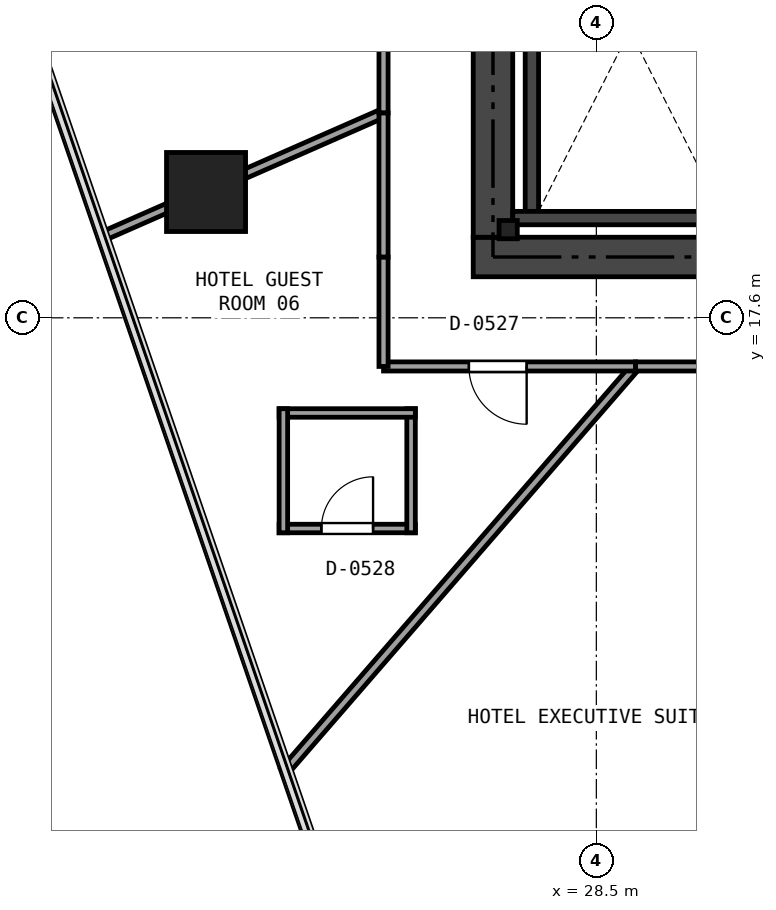
"""IFC4 building model, lengths in metres.
Left out: names, types, materials, properties, quantities, classifications, styles, units other than length and angle.
Written with IfcOpenShell. Run it as: python <this file> out.ifc"""

import sys

from ifc_helpers import new_model, si_unit, direction, frame, frame_2d, origin, origin_2d, place, context, subcontext, project, spatial, rectangle, i_section, extrude, element, fill, save


model = new_model("IFC4")
c1 = context("Model", 3, precision=1e-05, world=origin(), true_north=direction((0.0, 1.0)))
c2 = subcontext(c1, "Body", "Model", "MODEL_VIEW")
j1 = project(units=[si_unit("LENGTHUNIT", "METRE"), si_unit("PLANEANGLEUNIT", "RADIAN")], contexts=[c1])
p1 = place(None, origin())
s1 = spatial("IfcSite", under=j1, at=p1, CompositionType="ELEMENT")
p2 = place(p1, origin())
s2 = spatial("IfcBuilding", under=s1, at=p2, CompositionType="ELEMENT")
p3 = place(p2, frame((0.0, 0.0, 27.0)))
s3 = spatial("IfcBuildingStorey", under=s2, at=p3, CompositionType="ELEMENT", Elevation=27.0)
p4 = place(p3, frame((26.475, 18.6, 0.0), z_axis=(0.0, 0.0, 1.0), x_axis=(1.0, 0.0, 0.0)))
e1 = element("IfcWall", 1, at=p4, inside=s3, PredefinedType="SHEAR", context=c2, shape_type="SweptSolid", body=[
    extrude(rectangle(XDim=21.45, YDim=0.65, at=frame_2d((10.725, 0.0))), origin(), (0.0, 0.0, 1.0), 3.17),
])
p5 = place(p4, frame((12.45, 0.0, 0.0)))
e2 = element("IfcOpeningElement", 2, at=p5, cuts=e1, PredefinedType="OPENING", context=c2, shape_type="SweptSolid", body=[
    extrude(rectangle(XDim=1.15, YDim=2.15, at=frame_2d((0.575, 1.075))), frame((0.0, 0.335, 0.0), z_axis=(0.0, -1.0, 0.0), x_axis=(1.0, 0.0, 0.0)), (0.0, 0.0, 1.0), 0.67),
])
p6 = place(p4, frame((5.275, 0.0, 0.0)))
e3 = element("IfcOpeningElement", 3, at=p6, cuts=e1, PredefinedType="OPENING", context=c2, shape_type="SweptSolid", body=[
    extrude(rectangle(XDim=0.9, YDim=2.1, at=frame_2d((0.45, 1.05))), frame((0.0, 0.335, 0.0), z_axis=(0.0, -1.0, 0.0), x_axis=(1.0, 0.0, 0.0)), (0.0, 0.0, 1.0), 0.67),
])
p7 = place(p3, frame((26.8, 18.925, 0.0), z_axis=(0.0, 0.0, 1.0), x_axis=(0.0, 1.0, 0.0)))
e4 = element("IfcWall", 4, at=p7, inside=s3, PredefinedType="SHEAR", context=c2, shape_type="SweptSolid", body=[
    extrude(rectangle(XDim=14.95, YDim=0.65, at=frame_2d((7.475, 0.0))), origin(), (0.0, 0.0, 1.0), 3.17),
])
p8 = place(p3, frame((27.44, 19.35, 0.0), z_axis=(0.0, 0.0, 1.0), x_axis=(0.0, 1.0, 0.0)))
e5 = element("IfcWall", 5, at=p8, inside=s3, PredefinedType="SHEAR", context=c2, shape_type="SweptSolid", body=[
    extrude(rectangle(XDim=7.4, YDim=0.22, at=frame_2d((3.7, 0.0))), origin(), (0.0, 0.0, 1.0), 3.17),
])
p9 = place(p3, frame((27.125, 19.24, 0.0), z_axis=(0.0, 0.0, 1.0), x_axis=(1.0, 0.0, 0.0)))
e6 = element("IfcWall", 6, at=p9, inside=s3, PredefinedType="SHEAR", context=c2, shape_type="SweptSolid", body=[
    extrude(rectangle(XDim=3.425, YDim=0.22, at=frame_2d((1.712, 0.0))), origin(), (0.0, 0.0, 1.0), 3.17),
])
p10 = place(p3, frame((22.081, 19.669, -0.405), z_axis=(0.0, 0.0, 1.0), x_axis=(1.0, 0.0, 0.0)))
e7 = element("IfcColumn", 7, at=p10, inside=s3, PredefinedType="COLUMN", context=c2, shape_type="SweptSolid", body=[
    extrude(rectangle(XDim=1.3, YDim=1.3, at=origin_2d()), origin(), (0.0, 0.0, 1.0), 3.575),
])
p11 = place(p3, frame((27.05, 19.05, 0.0), z_axis=(0.0, 0.0, 1.0), x_axis=(1.0, 0.0, 0.0)))
e8 = element("IfcColumn", 8, at=p11, inside=s3, PredefinedType="PILASTER", context=c2, shape_type="SweptSolid", body=[
    extrude(i_section(OverallWidth=0.3, OverallDepth=0.3, WebThickness=0.011, FlangeThickness=0.019, at=origin_2d()), origin(), (0.0, 0.0, 1.0), 3.17),
])
p12 = place(p3, frame((23.283, 14.135, 0.0), z_axis=(0.0, 0.0, 1.0), x_axis=(1.0, 0.0, 0.0)))
e9 = element("IfcWall", 9, at=p12, inside=s3, PredefinedType="PARTITIONING", context=c2, shape_type="SweptSolid", body=[
    extrude(rectangle(XDim=2.24, YDim=0.14, at=frame_2d((1.12, 0.0))), origin(), (0.0, 0.0, 1.0), 3.17),
])
p13 = place(p12, frame((0.695, 0.0, 0.0)))
e10 = element("IfcOpeningElement", 10, at=p13, cuts=e9, PredefinedType="OPENING", context=c2, shape_type="SweptSolid", body=[
    extrude(rectangle(XDim=0.85, YDim=2.1, at=frame_2d((0.425, 1.05))), frame((0.0, 0.08, 0.0), z_axis=(0.0, -1.0, 0.0), x_axis=(1.0, 0.0, 0.0)), (0.0, 0.0, 1.0), 0.16),
])
p14 = place(p3, frame((25.453, 14.065, 0.0), z_axis=(0.0, 0.0, 1.0), x_axis=(0.0, 1.0, 0.0)))
e11 = element("IfcWall", 11, at=p14, inside=s3, PredefinedType="PARTITIONING", context=c2, shape_type="SweptSolid", body=[
    extrude(rectangle(XDim=2.04, YDim=0.14, at=frame_2d((1.02, 0.0))), origin(), (0.0, 0.0, 1.0), 3.17),
])
p15 = place(p3, frame((25.523, 16.035, 0.0), z_axis=(0.0, 0.0, 1.0), x_axis=(-1.0, 0.0, 0.0)))
e12 = element("IfcWall", 12, at=p15, inside=s3, PredefinedType="PARTITIONING", context=c2, shape_type="SweptSolid", body=[
    extrude(rectangle(XDim=2.24, YDim=0.14, at=frame_2d((1.12, 0.0))), origin(), (0.0, 0.0, 1.0), 3.17),
])
p16 = place(p3, frame((23.353, 16.105, 0.0), z_axis=(0.0, 0.0, 1.0), x_axis=(0.0, -1.0, 0.0)))
e13 = element("IfcWall", 13, at=p16, inside=s3, PredefinedType="PARTITIONING", context=c2, shape_type="SweptSolid", body=[
    extrude(rectangle(XDim=2.04, YDim=0.14, at=frame_2d((1.02, 0.0))), origin(), (0.0, 0.0, 1.0), 3.17),
])
p17 = place(p3, frame((20.36, 18.93, 0.0), z_axis=(0.0, 0.0, 1.0), x_axis=(0.915567029413, 0.402165407079, 0.0)))
e14 = element("IfcWall", 14, at=p17, inside=s3, PredefinedType="PARTITIONING", context=c2, shape_type="SweptSolid", body=[
    extrude(rectangle(XDim=5.068, YDim=0.15, at=frame_2d((2.534, 0.0))), origin(), (0.0, 0.0, 1.0), 2.395),
])
p18 = place(p3, frame((25.0, 20.968, 0.0), z_axis=(0.0, 0.0, 1.0), x_axis=(0.0, 1.0, 0.0)))
e15 = element("IfcWall", 15, at=p18, inside=s3, PredefinedType="PARTITIONING", context=c2, shape_type="SweptSolid", body=[
    extrude(rectangle(XDim=6.714, YDim=0.15, at=frame_2d((3.357, 0.0))), origin(), (0.0, 0.0, 1.0), 2.395),
])
p19 = place(p18, frame((2.882, 0.0, 0.0)))
e16 = element("IfcOpeningElement", 16, at=p19, cuts=e15, PredefinedType="OPENING", context=c2, shape_type="SweptSolid", body=[
    extrude(rectangle(XDim=0.95, YDim=2.15, at=frame_2d((0.475, 1.075))), frame((0.0, 0.085, 0.0), z_axis=(0.0, -1.0, 0.0), x_axis=(1.0, 0.0, 0.0)), (0.0, 0.0, 1.0), 0.17),
])
p20 = place(p3, frame((23.368, 10.14, 0.0), z_axis=(0.0, 0.0, 1.0), x_axis=(0.655252017972, 0.75541034739, 0.0)))
e17 = element("IfcWall", 17, at=p20, inside=s3, PredefinedType="PARTITIONING", context=c2, shape_type="SweptSolid", body=[
    extrude(rectangle(XDim=8.817, YDim=0.15, at=frame_2d((4.408, 0.0))), origin(), (0.0, 0.0, 1.0), 2.355),
])
p21 = place(p3, frame((29.145, 16.8, 0.0), z_axis=(0.0, 0.0, 1.0), x_axis=(-1.0, 0.0, 0.0)))
e18 = element("IfcWall", 18, at=p21, inside=s3, PredefinedType="PARTITIONING", context=c2, shape_type="SweptSolid", body=[
    extrude(rectangle(XDim=4.145, YDim=0.15, at=frame_2d((2.073, 0.0))), origin(), (0.0, 0.0, 1.0), 2.355),
])
p22 = place(p21, frame((1.791, 0.0, 0.0)))
e19 = element("IfcOpeningElement", 19, at=p22, cuts=e18, PredefinedType="OPENING", context=c2, shape_type="SweptSolid", body=[
    extrude(rectangle(XDim=0.95, YDim=2.15, at=frame_2d((0.475, 1.075))), frame((0.0, 0.085, 0.0), z_axis=(0.0, -1.0, 0.0), x_axis=(1.0, 0.0, 0.0)), (0.0, 0.0, 1.0), 0.17),
])
p23 = place(p3, frame((25.0, 16.8, 0.0), z_axis=(0.0, 0.0, 1.0), x_axis=(0.0, 1.0, 0.0)))
e20 = element("IfcWall", 20, at=p23, inside=s3, PredefinedType="PARTITIONING", context=c2, shape_type="SweptSolid", body=[
    extrude(rectangle(XDim=1.8, YDim=0.15, at=frame_2d((0.9, 0.0))), origin(), (0.0, 0.0, 1.0), 2.355),
])
p24 = place(p3, frame((25.0, 18.6, 0.0), z_axis=(0.0, 0.0, 1.0), x_axis=(0.0, 1.0, 0.0)))
e21 = element("IfcWall", 21, at=p24, inside=s3, PredefinedType="PARTITIONING", context=c2, shape_type="SweptSolid", body=[
    extrude(rectangle(XDim=2.368, YDim=0.15, at=frame_2d((1.184, 0.0))), origin(), (0.0, 0.0, 1.0), 2.395),
])
p25 = place(p3, frame((29.044, 1.056, 0.0), z_axis=(0.0, 0.0, 1.0), x_axis=(0.304719993412, 0.952441980183, 0.0)))
e22 = element("IfcWall", 22, at=p25, inside=s3, PredefinedType="PARTITIONING", context=c2, shape_type="SweptSolid", body=[
    extrude(rectangle(XDim=16.53, YDim=0.15, at=frame_2d((8.265, 0.0))), origin(), (0.0, 0.0, 1.0), 2.395),
])
p26 = place(p3, frame((34.081, 16.8, 0.0), z_axis=(0.0, 0.0, 1.0), x_axis=(-1.0, 0.0, 0.0)))
e23 = element("IfcWall", 23, at=p26, inside=s3, PredefinedType="PARTITIONING", context=c2, shape_type="SweptSolid", body=[
    extrude(rectangle(XDim=4.936, YDim=0.15, at=frame_2d((2.468, 0.0))), origin(), (0.0, 0.0, 1.0), 2.395),
])
p27 = place(p26, frame((1.993, 0.0, 0.0)))
e24 = element("IfcOpeningElement", 24, at=p27, cuts=e23, PredefinedType="OPENING", context=c2, shape_type="SweptSolid", body=[
    extrude(rectangle(XDim=0.95, YDim=2.15, at=frame_2d((0.475, 1.075))), frame((0.0, 0.085, 0.0), z_axis=(0.0, -1.0, 0.0), x_axis=(1.0, 0.0, 0.0)), (0.0, 0.0, 1.0), 0.17),
])
p28 = place(p22, origin())
e25 = element("IfcDoor", 25, at=p28, inside=s3, OperationType="SINGLE_SWING_LEFT", PredefinedType="DOOR", context=c2, shape_type="SweptSolid", body=[
    extrude(rectangle(XDim=0.95, YDim=2.15, at=frame_2d((0.475, 1.075))), frame((0.0, 0.025, 0.0), z_axis=(0.0, -1.0, 0.0), x_axis=(1.0, 0.0, 0.0)), (0.0, 0.0, 1.0), 0.05),
])
fill(e19, e25)
p29 = place(p13, origin())
e26 = element("IfcDoor", 26, at=p29, inside=s3, OperationType="SINGLE_SWING_RIGHT", PredefinedType="DOOR", context=c2, shape_type="SweptSolid", body=[
    extrude(rectangle(XDim=0.85, YDim=2.1, at=frame_2d((0.425, 1.05))), frame((0.0, 0.025, 0.0), z_axis=(0.0, -1.0, 0.0), x_axis=(1.0, 0.0, 0.0)), (0.0, 0.0, 1.0), 0.05),
])
fill(e10, e26)
save(model, sys.argv[1])
